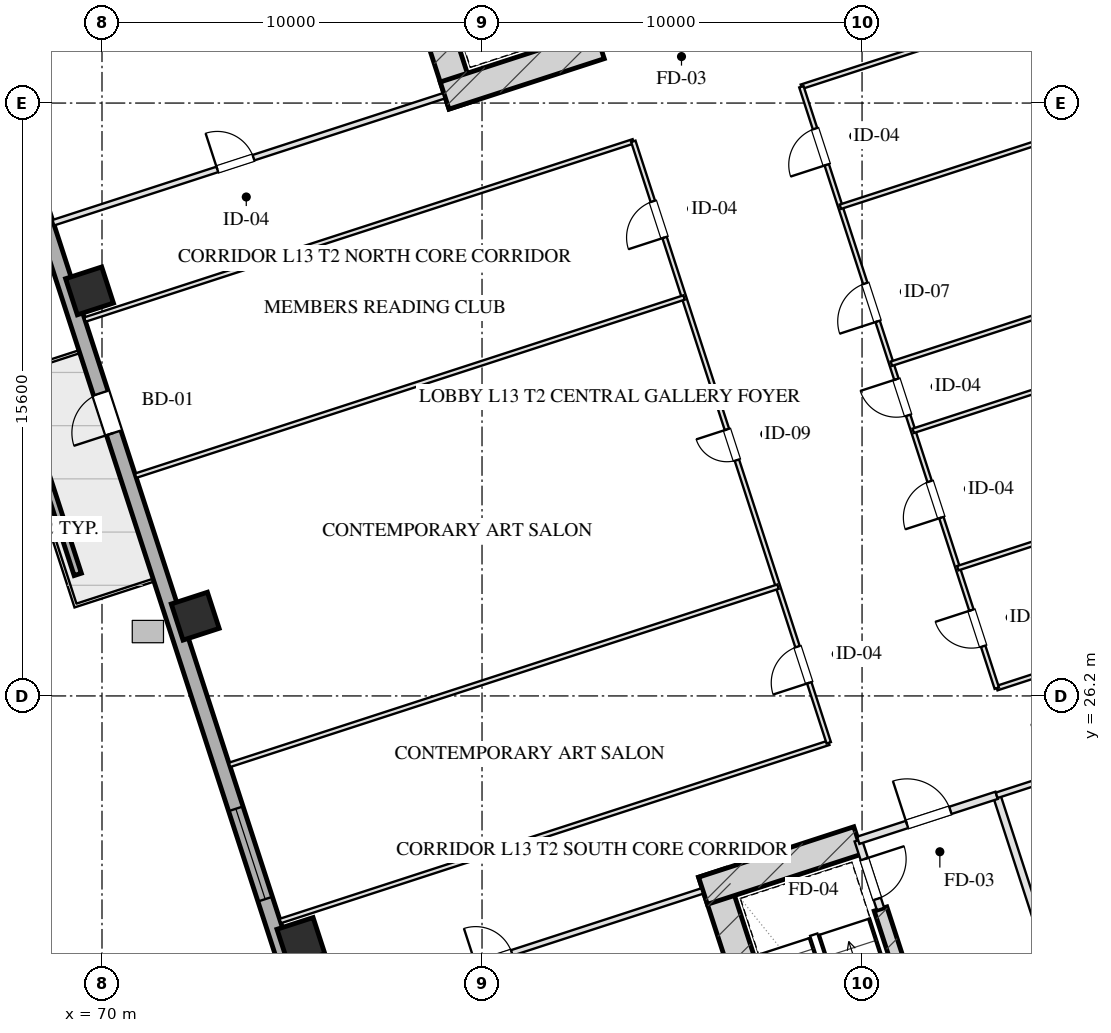
"""IFC4 building model, lengths in metres.
Left out: names, types, materials, properties, quantities, classifications, styles, units other than length and angle.
Written with IfcOpenShell. Run it as: python <this file> out.ifc"""

import sys

from ifc_helpers import new_model, si_unit, direction, frame, frame_2d, origin, origin_2d, place, context, subcontext, project, spatial, rectangle, hollow_rectangle, extrude, element, fill, save


model = new_model("IFC4")
c1 = context("Model", 3, precision=1e-05, world=origin(), true_north=direction((0.0, 1.0)))
c2 = subcontext(c1, "Body", "Model", "MODEL_VIEW")
j1 = project(units=[si_unit("LENGTHUNIT", "METRE"), si_unit("PLANEANGLEUNIT", "RADIAN")], contexts=[c1])
p1 = place(None, origin())
s1 = spatial("IfcSite", under=j1, at=p1, CompositionType="ELEMENT")
p2 = place(p1, origin())
s2 = spatial("IfcBuilding", under=s1, at=p2, CompositionType="ELEMENT")
p3 = place(p2, frame((0.0, 0.0, 57.5)))
s3 = spatial("IfcBuildingStorey", under=s2, at=p3, CompositionType="ELEMENT", Elevation=57.5)
p4 = place(p3, frame((86.055, 21.546, 0.0), z_axis=(0.0, 0.0, 1.0), x_axis=(0.309023585745, -0.951054374604, 0.0)))
e1 = element("IfcWall", 1, at=p4, inside=s3, PredefinedType="SHEAR", context=c2, shape_type="SweptSolid", body=[
    extrude(rectangle(XDim=9.63, YDim=0.75, at=frame_2d((4.815, 0.0))), origin(), (0.0, 0.0, 1.0), 3.45),
])
p5 = place(p3, frame((90.486, 20.594, 0.0), z_axis=(0.0, 0.0, 1.0), x_axis=(0.309020428229, -0.951055400562, 0.0)))
e2 = element("IfcWall", 2, at=p5, inside=s3, PredefinedType="SHEAR", context=c2, shape_type="SweptSolid", body=[
    extrude(rectangle(XDim=6.98, YDim=0.35, at=frame_2d((3.49, 0.0))), origin(), (0.0, 0.0, 1.0), 3.45),
])
p6 = place(p3, frame((85.814, 21.074, 0.0), z_axis=(0.0, 0.0, 1.0), x_axis=(0.95106580992, 0.308988390074, 0.0)))
e3 = element("IfcWall", 3, at=p6, inside=s3, PredefinedType="SHEAR", context=c2, shape_type="SweptSolid", body=[
    extrude(rectangle(XDim=4.295, YDim=0.75, at=frame_2d((2.147, 0.0))), origin(), (0.0, 0.0, 1.0), 3.45),
])
p7 = place(p3, frame((79.489, 41.756, 0.0), z_axis=(0.0, 0.0, 1.0), x_axis=(-0.309016134813, 0.951056795583, 0.0)))
e4 = element("IfcWall", 4, at=p7, inside=s3, PredefinedType="SHEAR", context=c2, shape_type="SweptSolid", body=[
    extrude(rectangle(XDim=9.63, YDim=0.75, at=frame_2d((4.815, 0.0))), origin(), (0.0, 0.0, 1.0), 3.45),
])
p8 = place(p3, frame((79.016, 41.997, 0.0), z_axis=(0.0, 0.0, 1.0), x_axis=(0.95106038264, 0.309005094736, 0.0)))
e5 = element("IfcWall", 5, at=p8, inside=s3, PredefinedType="SHEAR", context=c2, shape_type="SweptSolid", body=[
    extrude(rectangle(XDim=4.295, YDim=0.75, at=frame_2d((2.147, 0.0))), origin(), (0.0, 0.0, 1.0), 3.45),
])
for number, where, z_axis, x_axis in (
    (6, (75.234, 19.739, 0.0), (0.0, 0.0, 1.0), (0.951, 0.309, 0.0)),
    (7, (72.453, 28.299, 0.0), (0.0, 0.0, 1.0), (0.951, 0.309, 0.0)),
    (8, (69.672, 36.858, 0.0), (0.0, 0.0, 1.0), (0.951, 0.309, 0.0)),
):
    element("IfcColumn", number, at=place(p3, frame(where, z_axis=z_axis, x_axis=x_axis)), inside=s3, PredefinedType="COLUMN", context=c2, shape_type="SweptSolid", body=[
        extrude(hollow_rectangle(XDim=1.0, YDim=1.0, WallThickness=0.036, at=origin_2d()), origin(), (0.0, 0.0, 1.0), 3.451),
    ])
p9 = place(p3, frame((79.655, 4.352, 0.0), z_axis=(0.0, 0.0, 1.0), x_axis=(-0.309014526607, 0.951057318118, 0.0)))
e9 = element("IfcWall", 9, at=p9, inside=s3, PredefinedType="SOLIDWALL", context=c2, shape_type="SweptSolid", body=[
    extrude(rectangle(XDim=50.0, YDim=0.4, at=frame_2d((25.0, 0.0))), origin(), (0.0, 0.0, 1.0), 2.61),
])
p10 = place(p9, frame((17.35, 0.0, 0.75)))
e10 = element("IfcOpeningElement", 10, at=p10, cuts=e9, PredefinedType="OPENING", context=c2, shape_type="SweptSolid", body=[
    extrude(rectangle(XDim=2.5, YDim=1.46, at=frame_2d((1.25, 0.73))), frame((0.0, 0.21, 0.0), z_axis=(0.0, -1.0, 0.0), x_axis=(1.0, 0.0, 0.0)), (0.0, 0.0, 1.0), 0.42),
])
p11 = place(p9, frame((30.25, 0.0, 0.0)))
e11 = element("IfcOpeningElement", 11, at=p11, cuts=e9, PredefinedType="OPENING", context=c2, shape_type="SweptSolid", body=[
    extrude(rectangle(XDim=1.1, YDim=2.15, at=frame_2d((0.55, 1.075))), frame((0.0, 0.21, 0.0), z_axis=(0.0, -1.0, 0.0), x_axis=(1.0, 0.0, 0.0)), (0.0, 0.0, 1.0), 0.42),
])
p12 = place(p3, frame((69.362, 29.397, 0.0), z_axis=(0.0, 0.0, 1.0), x_axis=(-0.309032019345, 0.951051634255, 0.0)))
e12 = element("IfcWall", 12, at=p12, inside=s3, PredefinedType="PARAPET", context=c2, shape_type="SweptSolid", body=[
    extrude(rectangle(XDim=4.8, YDim=0.2, at=frame_2d((2.4, 0.0))), origin(), (0.0, 0.0, 1.0), 0.75),
])
p13 = place(p3, frame((89.899, 22.401, 0.0), z_axis=(0.0, 0.0, 1.0), x_axis=(0.308932062672, -0.951084108086, 0.0)))
e13 = element("IfcWall", 13, at=p13, inside=s3, PredefinedType="PARTITIONING", context=c2, shape_type="SweptSolid", body=[
    extrude(rectangle(XDim=1.9, YDim=0.2, at=frame_2d((0.95, 0.0))), origin(), (0.0, 0.0, 1.0), 3.175),
])
p14 = place(p13, frame((0.52, 0.0, 0.0)))
e14 = element("IfcOpeningElement", 14, at=p14, cuts=e13, PredefinedType="OPENING", context=c2, shape_type="SweptSolid", body=[
    extrude(rectangle(XDim=1.1, YDim=2.05, at=frame_2d((0.55, 1.025))), frame((0.0, 0.11, 0.0), z_axis=(0.0, -1.0, 0.0), x_axis=(1.0, 0.0, 0.0)), (0.0, 0.0, 1.0), 0.22),
])
p15 = place(p3, frame((93.542, 23.585, 0.0), z_axis=(0.0, 0.0, 1.0), x_axis=(0.309042196757, -0.951048327176, 0.0)))
e15 = element("IfcWall", 15, at=p15, inside=s3, PredefinedType="PARTITIONING", context=c2, shape_type="SweptSolid", body=[
    extrude(rectangle(XDim=8.43, YDim=0.2, at=frame_2d((4.215, 0.0))), origin(), (0.0, 0.0, 1.0), 3.175),
])
p16 = place(p3, frame((89.899, 22.401, 0.0), z_axis=(0.0, 0.0, 1.0), x_axis=(0.951046716504, 0.309047153403, 0.0)))
e16 = element("IfcWall", 16, at=p16, inside=s3, PredefinedType="PARTITIONING", context=c2, shape_type="SweptSolid", body=[
    extrude(rectangle(XDim=3.83, YDim=0.2, at=frame_2d((1.915, 0.0))), origin(), (0.0, 0.0, 1.0), 3.175),
])
p17 = place(p16, frame((1.35, 0.0, 0.0)))
e17 = element("IfcOpeningElement", 17, at=p17, cuts=e16, PredefinedType="OPENING", context=c2, shape_type="SweptSolid", body=[
    extrude(rectangle(XDim=1.2, YDim=2.05, at=frame_2d((0.6, 1.025))), frame((0.0, 0.11, 0.0), z_axis=(0.0, -1.0, 0.0), x_axis=(1.0, 0.0, 0.0)), (0.0, 0.0, 1.0), 0.22),
])
p18 = place(p3, frame((93.542, 23.585, 0.0), z_axis=(0.0, 0.0, 1.0), x_axis=(0.951063829732, 0.308994485023, 0.0)))
e18 = element("IfcWall", 18, at=p18, inside=s3, PredefinedType="PARTITIONING", context=c2, shape_type="SweptSolid", body=[
    extrude(rectangle(XDim=4.4, YDim=0.15, at=frame_2d((2.2, 0.0))), origin(), (0.0, 0.0, 1.0), 3.175),
])
p19 = place(p18, frame((1.45, 0.0, 0.0)))
e19 = element("IfcOpeningElement", 19, at=p19, cuts=e18, PredefinedType="OPENING", context=c2, shape_type="SweptSolid", body=[
    extrude(rectangle(XDim=1.5, YDim=2.05, at=frame_2d((0.75, 1.025))), frame((0.0, 0.085, 0.0), z_axis=(0.0, -1.0, 0.0), x_axis=(1.0, 0.0, 0.0)), (0.0, 0.0, 1.0), 0.17),
])
p20 = place(p3, frame((75.519, 17.729, 0.0), z_axis=(0.0, 0.0, 1.0), x_axis=(0.951056658866, 0.309016555588, 0.0)))
e20 = element("IfcWall", 20, at=p20, inside=s3, PredefinedType="PARTITIONING", context=c2, shape_type="SweptSolid", body=[
    extrude(rectangle(XDim=10.8, YDim=0.15, at=frame_2d((5.4, 0.0))), origin(), (0.0, 0.0, 1.0), 3.175),
])
p21 = place(p20, frame((4.536, 0.0, 0.0)))
e21 = element("IfcOpeningElement", 21, at=p21, cuts=e20, PredefinedType="OPENING", context=c2, shape_type="SweptSolid", body=[
    extrude(rectangle(XDim=1.0, YDim=2.05, at=frame_2d((0.5, 1.025))), frame((0.0, 0.085, 0.0), z_axis=(0.0, -1.0, 0.0), x_axis=(1.0, 0.0, 0.0)), (0.0, 0.0, 1.0), 0.17),
])
p22 = place(p3, frame((68.721, 38.652, 0.0), z_axis=(0.0, 0.0, 1.0), x_axis=(0.951056658866, 0.309016555588, 0.0)))
e22 = element("IfcWall", 22, at=p22, inside=s3, PredefinedType="PARTITIONING", context=c2, shape_type="SweptSolid", body=[
    extrude(rectangle(XDim=10.8, YDim=0.15, at=frame_2d((5.4, 0.0))), origin(), (0.0, 0.0, 1.0), 3.175),
])
p23 = place(p22, frame((4.536, 0.0, 0.0)))
e23 = element("IfcOpeningElement", 23, at=p23, cuts=e22, PredefinedType="OPENING", context=c2, shape_type="SweptSolid", body=[
    extrude(rectangle(XDim=1.0, YDim=2.05, at=frame_2d((0.5, 1.025))), frame((0.0, 0.085, 0.0), z_axis=(0.0, -1.0, 0.0), x_axis=(1.0, 0.0, 0.0)), (0.0, 0.0, 1.0), 0.17),
])
p24 = place(p3, frame((74.691, 20.278, 0.0), z_axis=(0.0, 0.0, 1.0), x_axis=(0.951054756643, 0.309022409974, 0.0)))
e24 = element("IfcWall", 24, at=p24, inside=s3, PredefinedType="PARTITIONING", context=c2, shape_type="SweptSolid", body=[
    extrude(rectangle(XDim=15.175, YDim=0.12, at=frame_2d((7.587, 0.0))), origin(), (0.0, 0.0, 1.0), 3.175),
])
p25 = place(p3, frame((93.546, 26.404, 0.0), z_axis=(0.0, 0.0, 1.0), x_axis=(0.951058189574, 0.309011844505, 0.0)))
e25 = element("IfcWall", 25, at=p25, inside=s3, PredefinedType="PARTITIONING", context=c2, shape_type="SweptSolid", body=[
    extrude(rectangle(XDim=17.775, YDim=0.12, at=frame_2d((8.887, 0.0))), origin(), (0.0, 0.0, 1.0), 3.175),
])
p26 = place(p3, frame((69.549, 36.103, 0.0), z_axis=(0.0, 0.0, 1.0), x_axis=(0.951054756643, 0.309022409974, 0.0)))
e26 = element("IfcWall", 26, at=p26, inside=s3, PredefinedType="PARTITIONING", context=c2, shape_type="SweptSolid", body=[
    extrude(rectangle(XDim=15.175, YDim=0.12, at=frame_2d((7.587, 0.0))), origin(), (0.0, 0.0, 1.0), 3.175),
])
p27 = place(p3, frame((88.404, 42.229, 0.0), z_axis=(0.0, 0.0, 1.0), x_axis=(0.951054152931, 0.309024267966, 0.0)))
e27 = element("IfcWall", 27, at=p27, inside=s3, PredefinedType="PARTITIONING", context=c2, shape_type="SweptSolid", body=[
    extrude(rectangle(XDim=17.775, YDim=0.12, at=frame_2d((8.888, 0.0))), origin(), (0.0, 0.0, 1.0), 3.175),
])
p28 = place(p3, frame((89.124, 24.967, 0.0), z_axis=(0.0, 0.0, 1.0), x_axis=(-0.30901773025, 0.951056277195, 0.0)))
e28 = element("IfcWall", 28, at=p28, inside=s3, PredefinedType="PARTITIONING", context=c2, shape_type="SweptSolid", body=[
    extrude(rectangle(XDim=16.64, YDim=0.12, at=frame_2d((8.32, 0.0))), origin(), (0.0, 0.0, 1.0), 3.175),
])
p29 = place(p28, frame((1.66, 0.0, 0.0)))
e29 = element("IfcOpeningElement", 29, at=p29, cuts=e28, PredefinedType="OPENING", context=c2, shape_type="SweptSolid", body=[
    extrude(rectangle(XDim=1.0, YDim=2.05, at=frame_2d((0.5, 1.025))), frame((0.0, 0.07, 0.0), z_axis=(0.0, -1.0, 0.0), x_axis=(1.0, 0.0, 0.0)), (0.0, 0.0, 1.0), 0.14),
])
p30 = place(p28, frame((7.82, 0.0, 0.0)))
e30 = element("IfcOpeningElement", 30, at=p30, cuts=e28, PredefinedType="OPENING", context=c2, shape_type="SweptSolid", body=[
    extrude(rectangle(XDim=0.85, YDim=2.05, at=frame_2d((0.425, 1.025))), frame((0.0, 0.07, 0.0), z_axis=(0.0, -1.0, 0.0), x_axis=(1.0, 0.0, 0.0)), (0.0, 0.0, 1.0), 0.14),
])
p31 = place(p28, frame((13.98, 0.0, 0.0)))
e31 = element("IfcOpeningElement", 31, at=p31, cuts=e28, PredefinedType="OPENING", context=c2, shape_type="SweptSolid", body=[
    extrude(rectangle(XDim=1.0, YDim=2.05, at=frame_2d((0.5, 1.025))), frame((0.0, 0.07, 0.0), z_axis=(0.0, -1.0, 0.0), x_axis=(1.0, 0.0, 0.0)), (0.0, 0.0, 1.0), 0.14),
])
p32 = place(p3, frame((93.546, 26.404, 0.0), z_axis=(0.0, 0.0, 1.0), x_axis=(-0.309022042254, 0.951054876125, 0.0)))
e32 = element("IfcWall", 32, at=p32, inside=s3, PredefinedType="PARTITIONING", context=c2, shape_type="SweptSolid", body=[
    extrude(rectangle(XDim=16.64, YDim=0.12, at=frame_2d((8.32, 0.0))), origin(), (0.0, 0.0, 1.0), 3.175),
])
p33 = place(p32, frame((1.16, 0.0, 0.0)))
e33 = element("IfcOpeningElement", 33, at=p33, cuts=e32, PredefinedType="OPENING", context=c2, shape_type="SweptSolid", body=[
    extrude(rectangle(XDim=1.0, YDim=2.05, at=frame_2d((0.5, 1.025))), frame((0.0, 0.07, 0.0), z_axis=(0.0, -1.0, 0.0), x_axis=(1.0, 0.0, 0.0)), (0.0, 0.0, 1.0), 0.14),
])
p34 = place(p32, frame((4.72, 0.0, 0.0)))
e34 = element("IfcOpeningElement", 34, at=p34, cuts=e32, PredefinedType="OPENING", context=c2, shape_type="SweptSolid", body=[
    extrude(rectangle(XDim=1.0, YDim=2.05, at=frame_2d((0.5, 1.025))), frame((0.0, 0.07, 0.0), z_axis=(0.0, -1.0, 0.0), x_axis=(1.0, 0.0, 0.0)), (0.0, 0.0, 1.0), 0.14),
])
p35 = place(p32, frame((7.549, 0.0, 0.0)))
e35 = element("IfcOpeningElement", 35, at=p35, cuts=e32, PredefinedType="OPENING", context=c2, shape_type="SweptSolid", body=[
    extrude(rectangle(XDim=1.0, YDim=2.05, at=frame_2d((0.5, 1.025))), frame((0.0, 0.07, 0.0), z_axis=(0.0, -1.0, 0.0), x_axis=(1.0, 0.0, 0.0)), (0.0, 0.0, 1.0), 0.14),
])
p36 = place(p32, frame((10.148, 0.0, 0.0)))
e36 = element("IfcOpeningElement", 36, at=p36, cuts=e32, PredefinedType="OPENING", context=c2, shape_type="SweptSolid", body=[
    extrude(rectangle(XDim=1.05, YDim=2.05, at=frame_2d((0.525, 1.025))), frame((0.0, 0.07, 0.0), z_axis=(0.0, -1.0, 0.0), x_axis=(1.0, 0.0, 0.0)), (0.0, 0.0, 1.0), 0.14),
])
p37 = place(p32, frame((14.48, 0.0, 0.0)))
e37 = element("IfcOpeningElement", 37, at=p37, cuts=e32, PredefinedType="OPENING", context=c2, shape_type="SweptSolid", body=[
    extrude(rectangle(XDim=1.0, YDim=2.05, at=frame_2d((0.5, 1.025))), frame((0.0, 0.07, 0.0), z_axis=(0.0, -1.0, 0.0), x_axis=(1.0, 0.0, 0.0)), (0.0, 0.0, 1.0), 0.14),
])
for number, where, z_axis, x_axis in (
    (38, (73.356, 24.386, 0.0), (0.0, 0.0, 1.0), (0.951, 0.309, 0.0)),
    (39, (70.884, 31.995, 0.0), (0.0, 0.0, 1.0), (0.951, 0.309, 0.0)),
):
    element("IfcWall", number, at=place(p3, frame(where, z_axis=z_axis, x_axis=x_axis)), inside=s3, PredefinedType="PARTITIONING", context=c2, shape_type="SweptSolid", body=[
        extrude(rectangle(XDim=15.175, YDim=0.12, at=frame_2d((7.587, 0.0))), origin(), (0.0, 0.0, 1.0), 3.175),
    ])
for number, where, z_axis, x_axis in (
    (40, (92.52, 29.562, 0.0), (0.0, 0.0, 1.0), (0.951, 0.309, 0.0)),
    (41, (91.346, 33.176, 0.0), (0.0, 0.0, 1.0), (0.951, 0.309, 0.0)),
    (42, (90.772, 34.942, 0.0), (0.0, 0.0, 1.0), (0.951, 0.309, 0.0)),
    (43, (89.43, 39.072, 0.0), (0.0, 0.0, 1.0), (0.951, 0.309, 0.0)),
):
    element("IfcWall", number, at=place(p3, frame(where, z_axis=z_axis, x_axis=x_axis)), inside=s3, PredefinedType="PARTITIONING", context=c2, shape_type="SweptSolid", body=[
        extrude(rectangle(XDim=17.775, YDim=0.12, at=frame_2d((8.887, 0.0))), origin(), (0.0, 0.0, 1.0), 3.175),
    ])
p38 = place(p10, origin())
e44 = element("IfcWindow", 44, at=p38, inside=s3, PartitioningType="TRIPLE_PANEL_VERTICAL", PredefinedType="WINDOW", context=c2, shape_type="SweptSolid", body=[
    extrude(rectangle(XDim=2.5, YDim=1.46, at=frame_2d((1.25, 0.73))), frame((0.0, 0.03, 0.0), z_axis=(0.0, -1.0, 0.0), x_axis=(1.0, 0.0, 0.0)), (0.0, 0.0, 1.0), 0.06),
])
fill(e10, e44)
p39 = place(p11, origin())
e45 = element("IfcDoor", 45, at=p39, inside=s3, OperationType="SINGLE_SWING_LEFT", PredefinedType="DOOR", context=c2, shape_type="SweptSolid", body=[
    extrude(rectangle(XDim=1.1, YDim=2.15, at=frame_2d((0.55, 1.075))), frame((0.0, 0.025, 0.0), z_axis=(0.0, -1.0, 0.0), x_axis=(1.0, 0.0, 0.0)), (0.0, 0.0, 1.0), 0.05),
])
fill(e11, e45)
p40 = place(p14, origin())
e46 = element("IfcDoor", 46, at=p40, inside=s3, OperationType="SINGLE_SWING_LEFT", PredefinedType="DOOR", context=c2, shape_type="SweptSolid", body=[
    extrude(rectangle(XDim=1.1, YDim=2.05, at=frame_2d((0.55, 1.025))), frame((0.0, 0.025, 0.0), z_axis=(0.0, -1.0, 0.0), x_axis=(1.0, 0.0, 0.0)), (0.0, 0.0, 1.0), 0.05),
])
fill(e14, e46)
p41 = place(p17, origin())
e47 = element("IfcDoor", 47, at=p41, inside=s3, OperationType="SINGLE_SWING_LEFT", PredefinedType="DOOR", context=c2, shape_type="SweptSolid", body=[
    extrude(rectangle(XDim=1.2, YDim=2.05, at=frame_2d((0.6, 1.025))), frame((0.0, 0.025, 0.0), z_axis=(0.0, -1.0, 0.0), x_axis=(1.0, 0.0, 0.0)), (0.0, 0.0, 1.0), 0.05),
])
fill(e17, e47)
p42 = place(p21, origin())
e48 = element("IfcDoor", 48, at=p42, inside=s3, OperationType="SINGLE_SWING_LEFT", PredefinedType="DOOR", context=c2, shape_type="SweptSolid", body=[
    extrude(rectangle(XDim=1.0, YDim=2.05, at=frame_2d((0.5, 1.025))), frame((0.0, 0.025, 0.0), z_axis=(0.0, -1.0, 0.0), x_axis=(1.0, 0.0, 0.0)), (0.0, 0.0, 1.0), 0.05),
])
fill(e21, e48)
p43 = place(p23, origin())
e49 = element("IfcDoor", 49, at=p43, inside=s3, OperationType="SINGLE_SWING_LEFT", PredefinedType="DOOR", context=c2, shape_type="SweptSolid", body=[
    extrude(rectangle(XDim=1.0, YDim=2.05, at=frame_2d((0.5, 1.025))), frame((0.0, 0.025, 0.0), z_axis=(0.0, -1.0, 0.0), x_axis=(1.0, 0.0, 0.0)), (0.0, 0.0, 1.0), 0.05),
])
fill(e23, e49)
p44 = place(p29, origin())
e50 = element("IfcDoor", 50, at=p44, inside=s3, OperationType="SINGLE_SWING_LEFT", PredefinedType="DOOR", context=c2, shape_type="SweptSolid", body=[
    extrude(rectangle(XDim=1.0, YDim=2.05, at=frame_2d((0.5, 1.025))), frame((0.0, 0.025, 0.0), z_axis=(0.0, -1.0, 0.0), x_axis=(1.0, 0.0, 0.0)), (0.0, 0.0, 1.0), 0.05),
])
fill(e29, e50)
p45 = place(p30, origin())
e51 = element("IfcDoor", 51, at=p45, inside=s3, OperationType="SINGLE_SWING_RIGHT", PredefinedType="DOOR", context=c2, shape_type="SweptSolid", body=[
    extrude(rectangle(XDim=0.85, YDim=2.05, at=frame_2d((0.425, 1.025))), frame((0.0, 0.025, 0.0), z_axis=(0.0, -1.0, 0.0), x_axis=(1.0, 0.0, 0.0)), (0.0, 0.0, 1.0), 0.05),
])
fill(e30, e51)
p46 = place(p31, origin())
e52 = element("IfcDoor", 52, at=p46, inside=s3, OperationType="SINGLE_SWING_LEFT", PredefinedType="DOOR", context=c2, shape_type="SweptSolid", body=[
    extrude(rectangle(XDim=1.0, YDim=2.05, at=frame_2d((0.5, 1.025))), frame((0.0, 0.025, 0.0), z_axis=(0.0, -1.0, 0.0), x_axis=(1.0, 0.0, 0.0)), (0.0, 0.0, 1.0), 0.05),
])
fill(e31, e52)
p47 = place(p33, origin())
e53 = element("IfcDoor", 53, at=p47, inside=s3, OperationType="SINGLE_SWING_RIGHT", PredefinedType="DOOR", context=c2, shape_type="SweptSolid", body=[
    extrude(rectangle(XDim=1.0, YDim=2.05, at=frame_2d((0.5, 1.025))), frame((0.0, 0.025, 0.0), z_axis=(0.0, -1.0, 0.0), x_axis=(1.0, 0.0, 0.0)), (0.0, 0.0, 1.0), 0.05),
])
fill(e33, e53)
p48 = place(p34, origin())
e54 = element("IfcDoor", 54, at=p48, inside=s3, OperationType="SINGLE_SWING_LEFT", PredefinedType="DOOR", context=c2, shape_type="SweptSolid", body=[
    extrude(rectangle(XDim=1.0, YDim=2.05, at=frame_2d((0.5, 1.025))), frame((0.0, 0.025, 0.0), z_axis=(0.0, -1.0, 0.0), x_axis=(1.0, 0.0, 0.0)), (0.0, 0.0, 1.0), 0.05),
])
fill(e34, e54)
p49 = place(p35, origin())
e55 = element("IfcDoor", 55, at=p49, inside=s3, OperationType="SINGLE_SWING_RIGHT", PredefinedType="DOOR", context=c2, shape_type="SweptSolid", body=[
    extrude(rectangle(XDim=1.0, YDim=2.05, at=frame_2d((0.5, 1.025))), frame((0.0, 0.025, 0.0), z_axis=(0.0, -1.0, 0.0), x_axis=(1.0, 0.0, 0.0)), (0.0, 0.0, 1.0), 0.05),
])
fill(e35, e55)
p50 = place(p36, origin())
e56 = element("IfcDoor", 56, at=p50, inside=s3, OperationType="SINGLE_SWING_LEFT", PredefinedType="DOOR", context=c2, shape_type="SweptSolid", body=[
    extrude(rectangle(XDim=1.05, YDim=2.05, at=frame_2d((0.525, 1.025))), frame((0.0, 0.025, 0.0), z_axis=(0.0, -1.0, 0.0), x_axis=(1.0, 0.0, 0.0)), (0.0, 0.0, 1.0), 0.05),
])
fill(e36, e56)
p51 = place(p37, origin())
e57 = element("IfcDoor", 57, at=p51, inside=s3, OperationType="SINGLE_SWING_LEFT", PredefinedType="DOOR", context=c2, shape_type="SweptSolid", body=[
    extrude(rectangle(XDim=1.0, YDim=2.05, at=frame_2d((0.5, 1.025))), frame((0.0, 0.025, 0.0), z_axis=(0.0, -1.0, 0.0), x_axis=(1.0, 0.0, 0.0)), (0.0, 0.0, 1.0), 0.05),
])
fill(e37, e57)
save(model, sys.argv[1])
